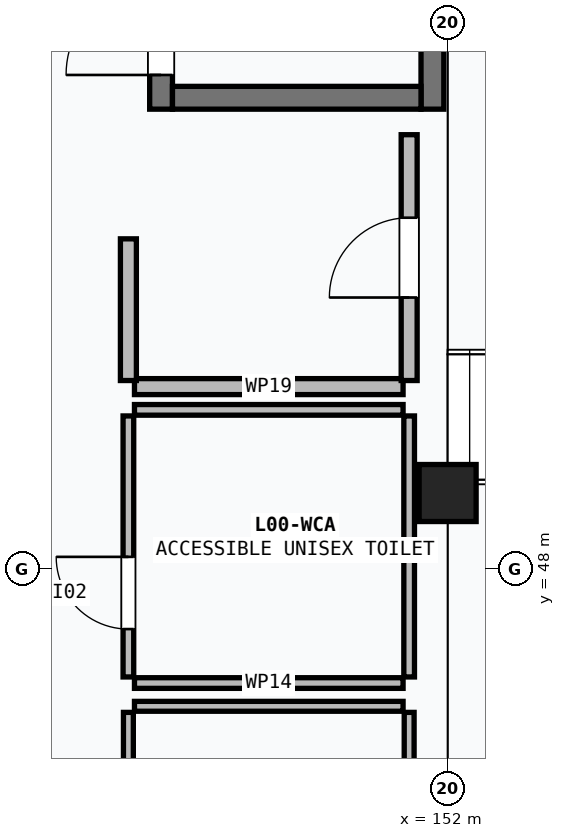
"""IFC4 building model, lengths in metres.
Left out: names, types, materials, properties, quantities, classifications, styles, units other than length and angle.
Written with IfcOpenShell. Run it as: python <this file> out.ifc"""

import sys

from ifc_helpers import new_model, si_unit, direction, frame, frame_2d, origin, origin_2d, place, context, subcontext, project, spatial, rectangle, extrude, element, fill, save


model = new_model("IFC4")
c1 = context("Model", 3, precision=1e-05, world=origin(), true_north=direction((0.0, 1.0)))
c2 = subcontext(c1, "Body", "Model", "MODEL_VIEW")
j1 = project(units=[si_unit("LENGTHUNIT", "METRE"), si_unit("PLANEANGLEUNIT", "RADIAN")], contexts=[c1])
p1 = place(None, origin())
s1 = spatial("IfcSite", under=j1, at=p1, CompositionType="ELEMENT")
p2 = place(p1, origin())
s2 = spatial("IfcBuilding", under=s1, at=p2, CompositionType="ELEMENT")
p3 = place(p2, origin())
s3 = spatial("IfcBuildingStorey", under=s2, at=p3, CompositionType="ELEMENT", Elevation=0.0)
p4 = place(p3, frame((152.0, 49.0, 0.0), z_axis=(0.0, 0.0, 1.0), x_axis=(1.0, 0.0, 0.0)))
e1 = element("IfcColumn", 1, at=p4, inside=s3, PredefinedType="COLUMN", context=c2, shape_type="SweptSolid", body=[
    extrude(rectangle(XDim=0.75, YDim=0.75, at=origin_2d()), origin(), (0.0, 0.0, 1.0), 4.5),
])
p5 = place(p3, frame((148.23, 54.05, 0.0), z_axis=(0.0, 0.0, 1.0), x_axis=(0.0, 1.0, 0.0)))
e2 = element("IfcWall", 2, at=p5, inside=s3, PredefinedType="SHEAR", context=c2, shape_type="SweptSolid", body=[
    extrude(rectangle(XDim=9.9, YDim=0.3, at=frame_2d((4.95, 0.0))), origin(), (0.0, 0.0, 1.0), 4.5),
])
p6 = place(p5, frame((0.45, 0.0, 0.0)))
e3 = element("IfcOpeningElement", 3, at=p6, cuts=e2, PredefinedType="OPENING", context=c2, shape_type="SweptSolid", body=[
    extrude(rectangle(XDim=1.25, YDim=2.2, at=frame_2d((0.625, 1.1))), frame((0.0, 0.16, 0.0), z_axis=(0.0, -1.0, 0.0), x_axis=(1.0, 0.0, 0.0)), (0.0, 0.0, 1.0), 0.32),
])
p7 = place(p3, frame((151.8, 63.95, 0.0), z_axis=(0.0, 0.0, 1.0), x_axis=(0.0, -1.0, 0.0)))
e4 = element("IfcWall", 4, at=p7, inside=s3, PredefinedType="SHEAR", context=c2, shape_type="SweptSolid", body=[
    extrude(rectangle(XDim=9.9, YDim=0.3, at=frame_2d((4.95, 0.0))), origin(), (0.0, 0.0, 1.0), 4.5),
])
p8 = place(p3, frame((151.65, 54.2, 0.0), z_axis=(0.0, 0.0, 1.0), x_axis=(-1.0, 0.0, 0.0)))
e5 = element("IfcWall", 5, at=p8, inside=s3, PredefinedType="SHEAR", context=c2, shape_type="SweptSolid", body=[
    extrude(rectangle(XDim=3.27, YDim=0.3, at=frame_2d((1.635, 0.0))), origin(), (0.0, 0.0, 1.0), 4.5),
])
p9 = place(p3, frame((147.88, 46.194, 0.0), z_axis=(0.0, 0.0, 1.0), x_axis=(1.0, 0.0, 0.0)))
e6 = element("IfcWall", 6, at=p9, inside=s3, PredefinedType="PARTITIONING", context=c2, shape_type="SweptSolid", body=[
    extrude(rectangle(XDim=3.534, YDim=0.13, at=frame_2d((1.767, 0.0))), origin(), (0.0, 0.0, 1.0), 4.245),
])
p10 = place(p3, frame((147.8, 42.68, 0.0), z_axis=(0.0, 0.0, 1.0), x_axis=(0.0, 1.0, 0.0)))
e7 = element("IfcWall", 7, at=p10, inside=s3, PredefinedType="PARTITIONING", context=c2, shape_type="SweptSolid", body=[
    extrude(rectangle(XDim=3.434, YDim=0.13, at=frame_2d((1.717, 0.0))), origin(), (0.0, 0.0, 1.0), 3.655),
])
p11 = place(p3, frame((151.494, 42.68, 0.0), z_axis=(0.0, 0.0, 1.0), x_axis=(0.0, 1.0, 0.0)))
e8 = element("IfcWall", 8, at=p11, inside=s3, PredefinedType="PARTITIONING", context=c2, shape_type="SweptSolid", body=[
    extrude(rectangle(XDim=3.434, YDim=0.13, at=frame_2d((1.717, 0.0))), origin(), (0.0, 0.0, 1.0), 3.655),
])
p12 = place(p11, frame((1.267, 0.0, 0.0)))
e9 = element("IfcOpeningElement", 9, at=p12, cuts=e8, PredefinedType="OPENING", context=c2, shape_type="SweptSolid", body=[
    extrude(rectangle(XDim=0.9, YDim=2.1, at=frame_2d((0.45, 1.05))), frame((0.0, 0.075, 0.0), z_axis=(0.0, -1.0, 0.0), x_axis=(1.0, 0.0, 0.0)), (0.0, 0.0, 1.0), 0.15),
])
for number, where, z_axis, x_axis in (
    (10, (147.88, 46.5, 0.0), (0.0, 0.0, 1.0), (1.0, 0.0, 0.0)),
    (11, (147.88, 50.094, 0.0), (0.0, 0.0, 1.0), (1.0, 0.0, 0.0)),
):
    element("IfcWall", number, at=place(p3, frame(where, z_axis=z_axis, x_axis=x_axis)), inside=s3, PredefinedType="PARTITIONING", context=c2, shape_type="SweptSolid", body=[
        extrude(rectangle(XDim=3.534, YDim=0.14, at=frame_2d((1.767, 0.0))), origin(), (0.0, 0.0, 1.0), 4.245),
    ])
p13 = place(p3, frame((147.8, 46.58, 0.0), z_axis=(0.0, 0.0, 1.0), x_axis=(0.0, 1.0, 0.0)))
e12 = element("IfcWall", 12, at=p13, inside=s3, PredefinedType="PARTITIONING", context=c2, shape_type="SweptSolid", body=[
    extrude(rectangle(XDim=3.434, YDim=0.14, at=frame_2d((1.717, 0.0))), origin(), (0.0, 0.0, 1.0), 3.395),
])
p14 = place(p13, frame((0.63, 0.0, 0.0)))
e13 = element("IfcOpeningElement", 13, at=p14, cuts=e12, PredefinedType="OPENING", context=c2, shape_type="SweptSolid", body=[
    extrude(rectangle(XDim=0.95, YDim=2.1, at=frame_2d((0.475, 1.05))), frame((0.0, 0.08, 0.0), z_axis=(0.0, -1.0, 0.0), x_axis=(1.0, 0.0, 0.0)), (0.0, 0.0, 1.0), 0.16),
])
p15 = place(p3, frame((151.494, 46.58, 0.0), z_axis=(0.0, 0.0, 1.0), x_axis=(0.0, 1.0, 0.0)))
e14 = element("IfcWall", 14, at=p15, inside=s3, PredefinedType="PARTITIONING", context=c2, shape_type="SweptSolid", body=[
    extrude(rectangle(XDim=3.434, YDim=0.14, at=frame_2d((1.717, 0.0))), origin(), (0.0, 0.0, 1.0), 3.395),
])
p16 = place(p3, frame((147.88, 50.4, 0.0), z_axis=(0.0, 0.0, 1.0), x_axis=(1.0, 0.0, 0.0)))
e15 = element("IfcWall", 15, at=p16, inside=s3, PredefinedType="PARTITIONING", context=c2, shape_type="SweptSolid", body=[
    extrude(rectangle(XDim=3.534, YDim=0.21, at=frame_2d((1.767, 0.0))), origin(), (0.0, 0.0, 1.0), 4.245),
])
p17 = place(p3, frame((147.8, 50.48, 0.0), z_axis=(0.0, 0.0, 1.0), x_axis=(0.0, 1.0, 0.0)))
e16 = element("IfcWall", 16, at=p17, inside=s3, PredefinedType="PARTITIONING", context=c2, shape_type="SweptSolid", body=[
    extrude(rectangle(XDim=1.864, YDim=0.21, at=frame_2d((0.932, 0.0))), origin(), (0.0, 0.0, 1.0), 3.655),
])
p18 = place(p3, frame((151.494, 50.48, 0.0), z_axis=(0.0, 0.0, 1.0), x_axis=(0.0, 1.0, 0.0)))
e17 = element("IfcWall", 17, at=p18, inside=s3, PredefinedType="PARTITIONING", context=c2, shape_type="SweptSolid", body=[
    extrude(rectangle(XDim=3.234, YDim=0.21, at=frame_2d((1.617, 0.0))), origin(), (0.0, 0.0, 1.0), 3.145),
])
p19 = place(p18, frame((1.092, 0.0, 0.0)))
e18 = element("IfcOpeningElement", 18, at=p19, cuts=e17, PredefinedType="OPENING", context=c2, shape_type="SweptSolid", body=[
    extrude(rectangle(XDim=1.05, YDim=2.15, at=frame_2d((0.525, 1.075))), frame((0.0, 0.115, 0.0), z_axis=(0.0, -1.0, 0.0), x_axis=(1.0, 0.0, 0.0)), (0.0, 0.0, 1.0), 0.23),
])
p20 = place(p6, origin())
e19 = element("IfcDoor", 19, at=p20, inside=s3, OperationType="SINGLE_SWING_LEFT", PredefinedType="DOOR", context=c2, shape_type="SweptSolid", body=[
    extrude(rectangle(XDim=1.25, YDim=2.2, at=frame_2d((0.625, 1.1))), frame((0.0, 0.025, 0.0), z_axis=(0.0, -1.0, 0.0), x_axis=(1.0, 0.0, 0.0)), (0.0, 0.0, 1.0), 0.05),
])
fill(e3, e19)
p21 = place(p14, origin())
e20 = element("IfcDoor", 20, at=p21, inside=s3, OperationType="SINGLE_SWING_RIGHT", PredefinedType="DOOR", context=c2, shape_type="SweptSolid", body=[
    extrude(rectangle(XDim=0.95, YDim=2.1, at=frame_2d((0.475, 1.05))), frame((0.0, 0.025, 0.0), z_axis=(0.0, -1.0, 0.0), x_axis=(1.0, 0.0, 0.0)), (0.0, 0.0, 1.0), 0.05),
])
fill(e13, e20)
p22 = place(p19, origin())
e21 = element("IfcDoor", 21, at=p22, inside=s3, OperationType="SINGLE_SWING_LEFT", PredefinedType="DOOR", context=c2, shape_type="SweptSolid", body=[
    extrude(rectangle(XDim=1.05, YDim=2.15, at=frame_2d((0.525, 1.075))), frame((0.0, 0.025, 0.0), z_axis=(0.0, -1.0, 0.0), x_axis=(1.0, 0.0, 0.0)), (0.0, 0.0, 1.0), 0.05),
])
fill(e18, e21)
save(model, sys.argv[1])
